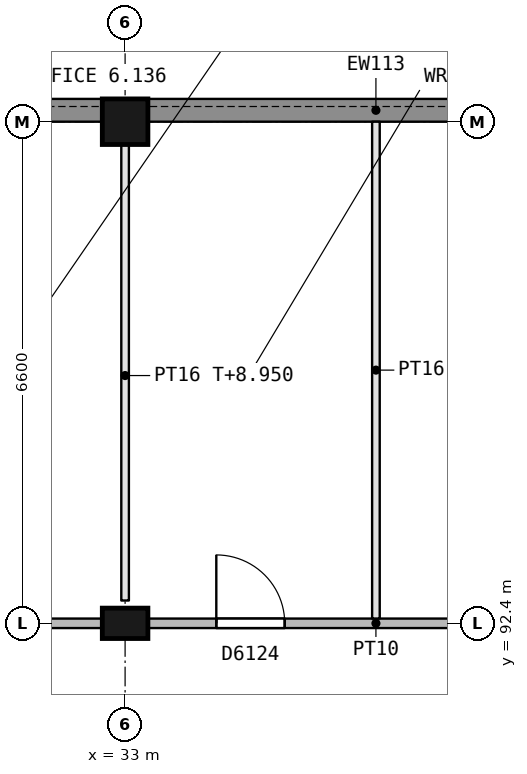
"""IFC4 building model, lengths in metres.
Left out: names, types, materials, properties, quantities, classifications, styles, units other than length and angle.
Written with IfcOpenShell. Run it as: python <this file> out.ifc"""

import sys

from ifc_helpers import new_model, si_unit, direction, frame, frame_2d, origin, origin_2d, place, context, subcontext, project, spatial, rectangle, extrude, element, fill, save


model = new_model("IFC4")
c1 = context("Model", 3, precision=1e-05, world=origin(), true_north=direction((0.0, 1.0)))
c2 = subcontext(c1, "Body", "Model", "MODEL_VIEW")
j1 = project(units=[si_unit("LENGTHUNIT", "METRE"), si_unit("PLANEANGLEUNIT", "RADIAN")], contexts=[c1])
p1 = place(None, origin())
s1 = spatial("IfcSite", under=j1, at=p1, CompositionType="ELEMENT")
p2 = place(p1, origin())
s2 = spatial("IfcBuilding", under=s1, at=p2, CompositionType="ELEMENT")
p3 = place(p2, frame((0.0, 0.0, 5.4)))
s3 = spatial("IfcBuildingStorey", under=s2, at=p3, CompositionType="ELEMENT", Elevation=5.4)
p4 = place(p3, frame((33.0, 92.4, 0.0), z_axis=(0.0, 0.0, 1.0), x_axis=(1.0, 0.0, 0.0)))
e1 = element("IfcColumn", 1, at=p4, inside=s3, PredefinedType="COLUMN", context=c2, shape_type="SweptSolid", body=[
    extrude(rectangle(XDim=0.6, YDim=0.4, at=origin_2d()), origin(), (0.0, 0.0, 1.0), 4.5),
])
p5 = place(p3, frame((33.0, 99.0, 0.0), z_axis=(0.0, 0.0, 1.0), x_axis=(1.0, 0.0, 0.0)))
e2 = element("IfcColumn", 2, at=p5, inside=s3, PredefinedType="COLUMN", context=c2, shape_type="SweptSolid", body=[
    extrude(rectangle(XDim=0.6, YDim=0.6, at=origin_2d()), origin(), (0.0, 0.0, 1.0), 4.5),
])
for number, where, z_axis, x_axis in (
    (3, (26.7, 99.15, 0.0), (0.0, 0.0, 1.0), (1.0, 0.0, 0.0)),
    (4, (33.3, 99.15, 0.0), (0.0, 0.0, 1.0), (1.0, 0.0, 0.0)),
):
    element("IfcWall", number, at=place(p3, frame(where, z_axis=z_axis, x_axis=x_axis)), inside=s3, PredefinedType="STANDARD", context=c2, shape_type="SweptSolid", body=[
        extrude(rectangle(XDim=6.0, YDim=0.3, at=frame_2d((3.0, 0.0))), origin(), (0.0, 0.0, 1.0), 3.65),
    ])
p6 = place(p3, frame((26.7, 92.4, 0.0), z_axis=(0.0, 0.0, 1.0), x_axis=(1.0, 0.0, 0.0)))
e5 = element("IfcWall", 5, at=p6, inside=s3, PredefinedType="PARTITIONING", context=c2, shape_type="SweptSolid", body=[
    extrude(rectangle(XDim=6.0, YDim=0.125, at=frame_2d((3.0, 0.0))), origin(), (0.0, 0.0, 1.0), 3.65),
])
p7 = place(p6, frame((0.9, 0.0, 0.0)))
e6 = element("IfcOpeningElement", 6, at=p7, cuts=e5, PredefinedType="OPENING", context=c2, shape_type="SweptSolid", body=[
    extrude(rectangle(XDim=0.9, YDim=2.1, at=frame_2d((0.45, 1.05))), frame((0.0, 0.073, 0.0), z_axis=(0.0, -1.0, 0.0), x_axis=(1.0, 0.0, 0.0)), (0.0, 0.0, 1.0), 0.145),
])
p8 = place(p6, frame((4.2, 0.0, 0.0)))
e7 = element("IfcOpeningElement", 7, at=p8, cuts=e5, PredefinedType="OPENING", context=c2, shape_type="SweptSolid", body=[
    extrude(rectangle(XDim=0.9, YDim=2.1, at=frame_2d((0.45, 1.05))), frame((0.0, 0.073, 0.0), z_axis=(0.0, -1.0, 0.0), x_axis=(1.0, 0.0, 0.0)), (0.0, 0.0, 1.0), 0.145),
])
p9 = place(p3, frame((33.3, 92.4, 0.0), z_axis=(0.0, 0.0, 1.0), x_axis=(1.0, 0.0, 0.0)))
e8 = element("IfcWall", 8, at=p9, inside=s3, PredefinedType="PARTITIONING", context=c2, shape_type="SweptSolid", body=[
    extrude(rectangle(XDim=6.0, YDim=0.125, at=frame_2d((3.0, 0.0))), origin(), (0.0, 0.0, 1.0), 3.65),
])
p10 = place(p9, frame((0.9, 0.0, 0.0)))
e9 = element("IfcOpeningElement", 9, at=p10, cuts=e8, PredefinedType="OPENING", context=c2, shape_type="SweptSolid", body=[
    extrude(rectangle(XDim=0.9, YDim=2.1, at=frame_2d((0.45, 1.05))), frame((0.0, 0.073, 0.0), z_axis=(0.0, -1.0, 0.0), x_axis=(1.0, 0.0, 0.0)), (0.0, 0.0, 1.0), 0.145),
])
p11 = place(p9, frame((4.2, 0.0, 0.0)))
e10 = element("IfcOpeningElement", 10, at=p11, cuts=e8, PredefinedType="OPENING", context=c2, shape_type="SweptSolid", body=[
    extrude(rectangle(XDim=0.9, YDim=2.1, at=frame_2d((0.45, 1.05))), frame((0.0, 0.073, 0.0), z_axis=(0.0, -1.0, 0.0), x_axis=(1.0, 0.0, 0.0)), (0.0, 0.0, 1.0), 0.145),
])
p12 = place(p3, frame((33.0, 92.7, 0.0), z_axis=(0.0, 0.0, 1.0), x_axis=(0.0, 1.0, 0.0)))
e11 = element("IfcWall", 11, at=p12, inside=s3, PredefinedType="PARTITIONING", context=c2, shape_type="SweptSolid", body=[
    extrude(rectangle(XDim=6.0, YDim=0.1, at=frame_2d((3.0, 0.0))), origin(), (0.0, 0.0, 1.0), 3.55),
])
p13 = place(p3, frame((36.3, 92.463, 0.0), z_axis=(0.0, 0.0, 1.0), x_axis=(0.0, 1.0, 0.0)))
e12 = element("IfcWall", 12, at=p13, inside=s3, PredefinedType="PARTITIONING", context=c2, shape_type="SweptSolid", body=[
    extrude(rectangle(XDim=6.537, YDim=0.1, at=frame_2d((3.269, 0.0))), origin(), (0.0, 0.0, 1.0), 3.65),
])
p14 = place(p10, origin())
e13 = element("IfcDoor", 13, at=p14, inside=s3, OperationType="SINGLE_SWING_LEFT", PredefinedType="DOOR", context=c2, shape_type="SweptSolid", body=[
    extrude(rectangle(XDim=0.9, YDim=2.1, at=frame_2d((0.45, 1.05))), frame((0.0, 0.025, 0.0), z_axis=(0.0, -1.0, 0.0), x_axis=(1.0, 0.0, 0.0)), (0.0, 0.0, 1.0), 0.05),
])
fill(e9, e13)
save(model, sys.argv[1])
